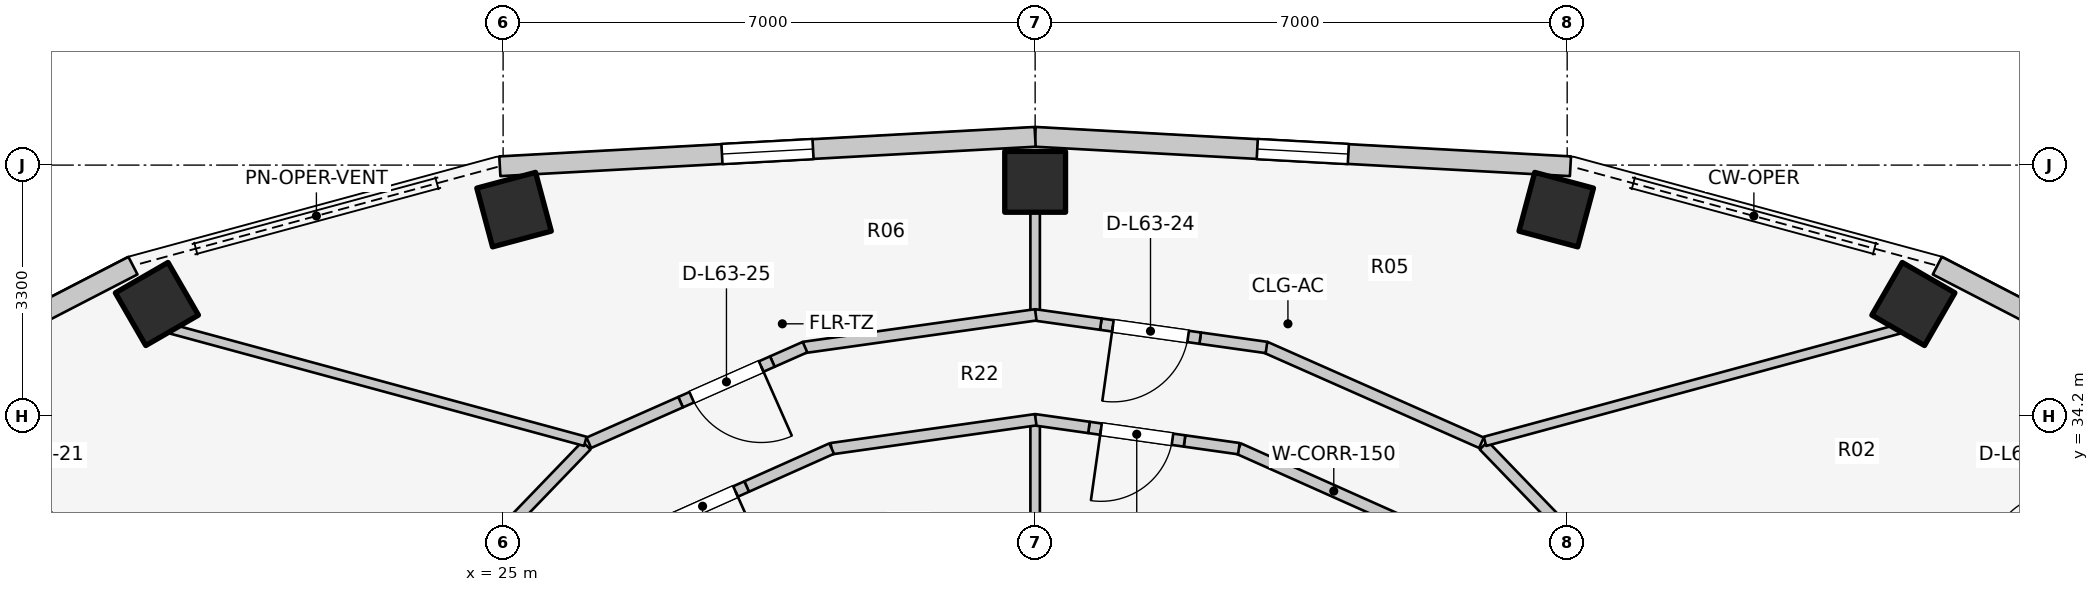
"""IFC4 building model, lengths in metres.
Left out: names, types, materials, properties, quantities, classifications, styles, units other than length and angle.
Written with IfcOpenShell. Run it as: python <this file> out.ifc"""

import sys

from ifc_helpers import new_model, si_unit, direction, frame, frame_2d, origin, origin_2d, place, context, subcontext, project, spatial, rectangle, extrude, element, fill, save


model = new_model("IFC4")
c1 = context("Model", 3, precision=1e-05, world=origin(), true_north=direction((0.0, 1.0)))
c2 = subcontext(c1, "Body", "Model", "MODEL_VIEW")
j1 = project(units=[si_unit("LENGTHUNIT", "METRE"), si_unit("PLANEANGLEUNIT", "RADIAN")], contexts=[c1])
p1 = place(None, origin())
s1 = spatial("IfcSite", under=j1, at=p1, CompositionType="ELEMENT")
p2 = place(p1, origin())
s2 = spatial("IfcBuilding", under=s1, at=p2, CompositionType="ELEMENT")
p3 = place(p2, frame((0.0, 0.0, 207.8)))
s3 = spatial("IfcBuildingStorey", under=s2, at=p3, CompositionType="ELEMENT", Elevation=207.8)
for number, where, z_axis, x_axis in (
    (1, (43.555, 35.673, 0.0), (0.0, 0.0, 1.0), (0.5, 0.866, 0.0)),
    (2, (38.856, 36.914, 0.0), (0.0, 0.0, 1.0), (0.259, 0.966, 0.0)),
    (3, (32.0, 37.28, 0.0), (0.0, 0.0, 1.0), (0.0, 1.0, 0.0)),
    (4, (25.144, 36.914, 0.0), (0.0, 0.0, 1.0), (-0.259, 0.966, 0.0)),
    (5, (20.445, 35.673, 0.0), (0.0, 0.0, 1.0), (-0.5, 0.866, 0.0)),
):
    element("IfcColumn", number, at=place(p3, frame(where, z_axis=z_axis, x_axis=x_axis)), inside=s3, PredefinedType="COLUMN", context=c2, shape_type="SweptSolid", body=[
        extrude(rectangle(XDim=0.8, YDim=0.8, at=origin_2d()), origin(), (0.0, 0.0, 1.0), 3.1),
    ])
p4 = place(p3, frame((47.558, 34.272, 0.0), z_axis=(0.0, 0.0, 1.0), x_axis=(-0.88849146803, 0.458893137057, 0.0)))
e6 = element("IfcWall", 6, at=p4, inside=s3, PredefinedType="STANDARD", context=c2, shape_type="SweptSolid", body=[
    extrude(rectangle(XDim=4.15, YDim=0.26, at=frame_2d((2.075, 0.0))), origin(), (0.0, 0.0, 1.0), 1.22),
])
p5 = place(p3, frame((39.043, 37.485, 0.0), z_axis=(0.0, 0.0, 1.0), x_axis=(-0.998490239527, 0.054929423535, 0.0)))
e7 = element("IfcWall", 7, at=p5, inside=s3, PredefinedType="STANDARD", context=c2, shape_type="SweptSolid", body=[
    extrude(rectangle(XDim=7.054, YDim=0.26, at=frame_2d((3.527, 0.0))), origin(), (0.0, 0.0, 1.0), 1.22),
])
p6 = place(p5, frame((2.927, 0.0, 0.15)))
e8 = element("IfcOpeningElement", 8, at=p6, cuts=e7, PredefinedType="OPENING", context=c2, shape_type="SweptSolid", body=[
    extrude(rectangle(XDim=1.2, YDim=0.9, at=frame_2d((0.6, 0.45))), frame((0.0, 0.14, 0.0), z_axis=(0.0, -1.0, 0.0), x_axis=(1.0, 0.0, 0.0)), (0.0, 0.0, 1.0), 0.28),
])
p7 = place(p3, frame((32.0, 37.872, 0.0), z_axis=(0.0, 0.0, 1.0), x_axis=(-0.998490239527, -0.054929423535, 0.0)))
e9 = element("IfcWall", 9, at=p7, inside=s3, PredefinedType="STANDARD", context=c2, shape_type="SweptSolid", body=[
    extrude(rectangle(XDim=7.054, YDim=0.26, at=frame_2d((3.527, 0.0))), origin(), (0.0, 0.0, 1.0), 1.22),
])
p8 = place(p7, frame((2.927, 0.0, 0.15)))
e10 = element("IfcOpeningElement", 10, at=p8, cuts=e9, PredefinedType="OPENING", context=c2, shape_type="SweptSolid", body=[
    extrude(rectangle(XDim=1.2, YDim=0.9, at=frame_2d((0.6, 0.45))), frame((0.0, 0.14, 0.0), z_axis=(0.0, -1.0, 0.0), x_axis=(1.0, 0.0, 0.0)), (0.0, 0.0, 1.0), 0.28),
])
p9 = place(p3, frame((20.13, 36.177, 0.0), z_axis=(0.0, 0.0, 1.0), x_axis=(-0.88849146803, -0.458893137057, 0.0)))
e11 = element("IfcWall", 11, at=p9, inside=s3, PredefinedType="STANDARD", context=c2, shape_type="SweptSolid", body=[
    extrude(rectangle(XDim=4.15, YDim=0.26, at=frame_2d((2.075, 0.0))), origin(), (0.0, 0.0, 1.0), 1.22),
])
p10 = place(p3, frame((32.0, 31.1, 0.0), z_axis=(0.0, 0.0, 1.0), x_axis=(0.0, 1.0, 0.0)))
e12 = element("IfcWall", 12, at=p10, inside=s3, PredefinedType="PARTITIONING", context=c2, shape_type="SweptSolid", body=[
    extrude(rectangle(XDim=3.05, YDim=0.125, at=frame_2d((1.525, 0.0))), origin(), (0.0, 0.0, 1.0), 2.096),
])
p11 = place(p3, frame((37.181, 32.652, 0.0), z_axis=(0.0, 0.0, 1.0), x_axis=(-0.913120130558, 0.407690602257, 0.0)))
e13 = element("IfcWall", 13, at=p11, inside=s3, PredefinedType="PARTITIONING", context=c2, shape_type="SweptSolid", body=[
    extrude(rectangle(XDim=2.743, YDim=0.15, at=frame_2d((1.371, 0.0))), origin(), (0.0, 0.0, 1.0), 2.096),
])
p12 = place(p3, frame((34.68, 33.77, 0.0), z_axis=(0.0, 0.0, 1.0), x_axis=(-0.990111099965, 0.140285458001, 0.0)))
e14 = element("IfcWall", 14, at=p12, inside=s3, PredefinedType="PARTITIONING", context=c2, shape_type="SweptSolid", body=[
    extrude(rectangle(XDim=0.722, YDim=0.15, at=frame_2d((0.361, 0.0))), origin(), (0.0, 0.0, 1.0), 2.575),
])
p13 = place(p3, frame((33.965, 33.871, 0.0), z_axis=(0.0, 0.0, 1.0), x_axis=(-0.990129408, 0.14015618222, 0.0)))
e15 = element("IfcWall", 15, at=p13, inside=s3, PredefinedType="PARTITIONING", context=c2, shape_type="SweptSolid", body=[
    extrude(rectangle(XDim=1.27, YDim=0.15, at=frame_2d((0.635, 0.0))), origin(), (0.0, 0.0, 1.0), 2.575),
])
p14 = place(p13, frame((0.16, 0.0, 0.0)))
e16 = element("IfcOpeningElement", 16, at=p14, cuts=e15, PredefinedType="OPENING", context=c2, shape_type="SweptSolid", body=[
    extrude(rectangle(XDim=0.95, YDim=2.1, at=frame_2d((0.475, 1.05))), frame((0.0, 0.085, 0.0), z_axis=(0.0, -1.0, 0.0), x_axis=(1.0, 0.0, 0.0)), (0.0, 0.0, 1.0), 0.17),
])
p15 = place(p3, frame((32.708, 34.049, 0.0), z_axis=(0.0, 0.0, 1.0), x_axis=(-0.990157999489, 0.139954049774, 0.0)))
e17 = element("IfcWall", 17, at=p15, inside=s3, PredefinedType="PARTITIONING", context=c2, shape_type="SweptSolid", body=[
    extrude(rectangle(XDim=0.722, YDim=0.15, at=frame_2d((0.361, 0.0))), origin(), (0.0, 0.0, 1.0), 2.096),
])
p16 = place(p3, frame((32.007, 34.15, 0.0), z_axis=(0.0, 0.0, 1.0), x_axis=(-0.990132151456, -0.140136799779, 0.0)))
e18 = element("IfcWall", 18, at=p16, inside=s3, PredefinedType="PARTITIONING", context=c2, shape_type="SweptSolid", body=[
    extrude(rectangle(XDim=2.714, YDim=0.15, at=frame_2d((1.357, 0.0))), origin(), (0.0, 0.0, 1.0), 2.096),
])
p17 = place(p3, frame((29.323, 33.771, 0.0), z_axis=(0.0, 0.0, 1.0), x_axis=(-0.913103438245, -0.40772798661, 0.0)))
e19 = element("IfcWall", 19, at=p17, inside=s3, PredefinedType="PARTITIONING", context=c2, shape_type="SweptSolid", body=[
    extrude(rectangle(XDim=1.225, YDim=0.15, at=frame_2d((0.613, 0.0))), origin(), (0.0, 0.0, 1.0), 2.096),
])
p18 = place(p3, frame((28.204, 33.271, 0.0), z_axis=(0.0, 0.0, 1.0), x_axis=(-0.913104656548, -0.407725258219, 0.0)))
e20 = element("IfcWall", 20, at=p18, inside=s3, PredefinedType="PARTITIONING", context=c2, shape_type="SweptSolid", body=[
    extrude(rectangle(XDim=1.27, YDim=0.15, at=frame_2d((0.635, 0.0))), origin(), (0.0, 0.0, 1.0), 2.16),
])
p19 = place(p18, frame((0.16, 0.0, 0.0)))
e21 = element("IfcOpeningElement", 21, at=p19, cuts=e20, PredefinedType="OPENING", context=c2, shape_type="SweptSolid", body=[
    extrude(rectangle(XDim=0.95, YDim=2.1, at=frame_2d((0.475, 1.05))), frame((0.0, 0.085, 0.0), z_axis=(0.0, -1.0, 0.0), x_axis=(1.0, 0.0, 0.0)), (0.0, 0.0, 1.0), 0.17),
])
for number, where, z_axis, x_axis in (
    (22, (37.903, 33.812, 0.0), (0.0, 0.0, 1.0), (0.694, -0.72, 0.0)),
    (23, (26.097, 33.812, 0.0), (0.0, 0.0, 1.0), (-0.694, -0.72, 0.0)),
):
    element("IfcWall", number, at=place(p3, frame(where, z_axis=z_axis, x_axis=x_axis)), inside=s3, PredefinedType="PARTITIONING", context=c2, shape_type="SweptSolid", body=[
        extrude(rectangle(XDim=2.158, YDim=0.15, at=frame_2d((1.079, 0.0))), origin(), (0.0, 0.0, 1.0), 2.096),
    ])
p20 = place(p3, frame((37.918, 33.866, 0.0), z_axis=(0.0, 0.0, 1.0), x_axis=(0.965109390289, 0.261847025523, 0.0)))
e24 = element("IfcWall", 24, at=p20, inside=s3, PredefinedType="PARTITIONING", context=c2, shape_type="SweptSolid", body=[
    extrude(rectangle(XDim=5.644, YDim=0.125, at=frame_2d((2.822, 0.0))), origin(), (0.0, 0.0, 1.0), 1.22),
])
p21 = place(p3, frame((32.0, 35.585, 0.0), z_axis=(0.0, 0.0, 1.0), x_axis=(0.0, 1.0, 0.0)))
e25 = element("IfcWall", 25, at=p21, inside=s3, PredefinedType="PARTITIONING", context=c2, shape_type="SweptSolid", body=[
    extrude(rectangle(XDim=1.315, YDim=0.125, at=frame_2d((0.657, 0.0))), origin(), (0.0, 0.0, 1.0), 1.22),
])
p22 = place(p3, frame((26.082, 33.866, 0.0), z_axis=(0.0, 0.0, 1.0), x_axis=(-0.965109390289, 0.261847025523, 0.0)))
e26 = element("IfcWall", 26, at=p22, inside=s3, PredefinedType="PARTITIONING", context=c2, shape_type="SweptSolid", body=[
    extrude(rectangle(XDim=5.644, YDim=0.125, at=frame_2d((2.822, 0.0))), origin(), (0.0, 0.0, 1.0), 1.22),
])
p23 = place(p3, frame((37.872, 33.847, 0.0), z_axis=(0.0, 0.0, 1.0), x_axis=(-0.914490094652, 0.40460828808, 0.0)))
e27 = element("IfcWall", 27, at=p23, inside=s3, PredefinedType="PARTITIONING", context=c2, shape_type="SweptSolid", body=[
    extrude(rectangle(XDim=3.11, YDim=0.15, at=frame_2d((1.555, 0.0))), origin(), (0.0, 0.0, 1.0), 2.096),
])
p24 = place(p3, frame((35.044, 35.101, 0.0), z_axis=(0.0, 0.0, 1.0), x_axis=(-0.990279252054, 0.139093504346, 0.0)))
e28 = element("IfcWall", 28, at=p24, inside=s3, PredefinedType="PARTITIONING", context=c2, shape_type="SweptSolid", body=[
    extrude(rectangle(XDim=0.881, YDim=0.15, at=frame_2d((0.44, 0.0))), origin(), (0.0, 0.0, 1.0), 2.575),
])
p25 = place(p3, frame((34.171, 35.223, 0.0), z_axis=(0.0, 0.0, 1.0), x_axis=(-0.990254187593, 0.139271834751, 0.0)))
e29 = element("IfcWall", 29, at=p25, inside=s3, PredefinedType="PARTITIONING", context=c2, shape_type="SweptSolid", body=[
    extrude(rectangle(XDim=1.32, YDim=0.15, at=frame_2d((0.66, 0.0))), origin(), (0.0, 0.0, 1.0), 2.575),
])
p26 = place(p25, frame((0.16, 0.0, 0.0)))
e30 = element("IfcOpeningElement", 30, at=p26, cuts=e29, PredefinedType="OPENING", context=c2, shape_type="SweptSolid", body=[
    extrude(rectangle(XDim=1.0, YDim=2.1, at=frame_2d((0.5, 1.05))), frame((0.0, 0.085, 0.0), z_axis=(0.0, -1.0, 0.0), x_axis=(1.0, 0.0, 0.0)), (0.0, 0.0, 1.0), 0.17),
])
p27 = place(p3, frame((32.864, 35.407, 0.0), z_axis=(0.0, 0.0, 1.0), x_axis=(-0.990241051041, 0.13936520668, 0.0)))
e31 = element("IfcWall", 31, at=p27, inside=s3, PredefinedType="PARTITIONING", context=c2, shape_type="SweptSolid", body=[
    extrude(rectangle(XDim=0.881, YDim=0.15, at=frame_2d((0.44, 0.0))), origin(), (0.0, 0.0, 1.0), 2.096),
])
p28 = place(p3, frame((32.008, 35.53, 0.0), z_axis=(0.0, 0.0, 1.0), x_axis=(-0.990257602807, -0.139247549651, 0.0)))
e32 = element("IfcWall", 32, at=p28, inside=s3, PredefinedType="PARTITIONING", context=c2, shape_type="SweptSolid", body=[
    extrude(rectangle(XDim=3.082, YDim=0.15, at=frame_2d((1.541, 0.0))), origin(), (0.0, 0.0, 1.0), 2.096),
])
p29 = place(p3, frame((28.972, 35.105, 0.0), z_axis=(0.0, 0.0, 1.0), x_axis=(-0.914431812955, -0.404739989939, 0.0)))
e33 = element("IfcWall", 33, at=p29, inside=s3, PredefinedType="PARTITIONING", context=c2, shape_type="SweptSolid", body=[
    extrude(rectangle(XDim=0.47, YDim=0.15, at=frame_2d((0.235, 0.0))), origin(), (0.0, 0.0, 1.0), 2.575),
])
p30 = place(p3, frame((28.542, 34.915, 0.0), z_axis=(0.0, 0.0, 1.0), x_axis=(-0.914519545761, -0.404541716541, 0.0)))
e34 = element("IfcWall", 34, at=p30, inside=s3, PredefinedType="PARTITIONING", context=c2, shape_type="SweptSolid", body=[
    extrude(rectangle(XDim=1.32, YDim=0.15, at=frame_2d((0.66, 0.0))), origin(), (0.0, 0.0, 1.0), 2.16),
])
p31 = place(p30, frame((0.16, 0.0, 0.0)))
e35 = element("IfcOpeningElement", 35, at=p31, cuts=e34, PredefinedType="OPENING", context=c2, shape_type="SweptSolid", body=[
    extrude(rectangle(XDim=1.0, YDim=2.1, at=frame_2d((0.5, 1.05))), frame((0.0, 0.085, 0.0), z_axis=(0.0, -1.0, 0.0), x_axis=(1.0, 0.0, 0.0)), (0.0, 0.0, 1.0), 0.17),
])
p32 = place(p3, frame((27.335, 34.381, 0.0), z_axis=(0.0, 0.0, 1.0), x_axis=(-0.914481389177, -0.404627963503, 0.0)))
e36 = element("IfcWall", 36, at=p32, inside=s3, PredefinedType="PARTITIONING", context=c2, shape_type="SweptSolid", body=[
    extrude(rectangle(XDim=1.32, YDim=0.15, at=frame_2d((0.66, 0.0))), origin(), (0.0, 0.0, 1.0), 2.096),
])
p33 = place(p6, origin())
e37 = element("IfcWindow", 37, at=p33, inside=s3, PartitioningType="SINGLE_PANEL", PredefinedType="WINDOW", context=c2, shape_type="SweptSolid", body=[
    extrude(rectangle(XDim=1.2, YDim=0.9, at=frame_2d((0.6, 0.45))), frame((0.0, 0.03, 0.0), z_axis=(0.0, -1.0, 0.0), x_axis=(1.0, 0.0, 0.0)), (0.0, 0.0, 1.0), 0.06),
])
fill(e8, e37)
p34 = place(p8, origin())
e38 = element("IfcWindow", 38, at=p34, inside=s3, PartitioningType="SINGLE_PANEL", PredefinedType="WINDOW", context=c2, shape_type="SweptSolid", body=[
    extrude(rectangle(XDim=1.2, YDim=0.9, at=frame_2d((0.6, 0.45))), frame((0.0, 0.03, 0.0), z_axis=(0.0, -1.0, 0.0), x_axis=(1.0, 0.0, 0.0)), (0.0, 0.0, 1.0), 0.06),
])
fill(e10, e38)
p35 = place(p14, origin())
e39 = element("IfcDoor", 39, at=p35, inside=s3, OperationType="SINGLE_SWING_RIGHT", PredefinedType="DOOR", context=c2, shape_type="SweptSolid", body=[
    extrude(rectangle(XDim=0.95, YDim=2.1, at=frame_2d((0.475, 1.05))), frame((0.0, 0.025, 0.0), z_axis=(0.0, -1.0, 0.0), x_axis=(1.0, 0.0, 0.0)), (0.0, 0.0, 1.0), 0.05),
])
fill(e16, e39)
p36 = place(p19, origin())
e40 = element("IfcDoor", 40, at=p36, inside=s3, OperationType="SINGLE_SWING_LEFT", PredefinedType="DOOR", context=c2, shape_type="SweptSolid", body=[
    extrude(rectangle(XDim=0.95, YDim=2.1, at=frame_2d((0.475, 1.05))), frame((0.0, 0.025, 0.0), z_axis=(0.0, -1.0, 0.0), x_axis=(1.0, 0.0, 0.0)), (0.0, 0.0, 1.0), 0.05),
])
fill(e21, e40)
p37 = place(p26, origin())
e41 = element("IfcDoor", 41, at=p37, inside=s3, OperationType="SINGLE_SWING_RIGHT", PredefinedType="DOOR", context=c2, shape_type="SweptSolid", body=[
    extrude(rectangle(XDim=1.0, YDim=2.1, at=frame_2d((0.5, 1.05))), frame((0.0, 0.025, 0.0), z_axis=(0.0, -1.0, 0.0), x_axis=(1.0, 0.0, 0.0)), (0.0, 0.0, 1.0), 0.05),
])
fill(e30, e41)
p38 = place(p31, origin())
e42 = element("IfcDoor", 42, at=p38, inside=s3, OperationType="SINGLE_SWING_LEFT", PredefinedType="DOOR", context=c2, shape_type="SweptSolid", body=[
    extrude(rectangle(XDim=1.0, YDim=2.1, at=frame_2d((0.5, 1.05))), frame((0.0, 0.025, 0.0), z_axis=(0.0, -1.0, 0.0), x_axis=(1.0, 0.0, 0.0)), (0.0, 0.0, 1.0), 0.05),
])
fill(e35, e42)
save(model, sys.argv[1])
